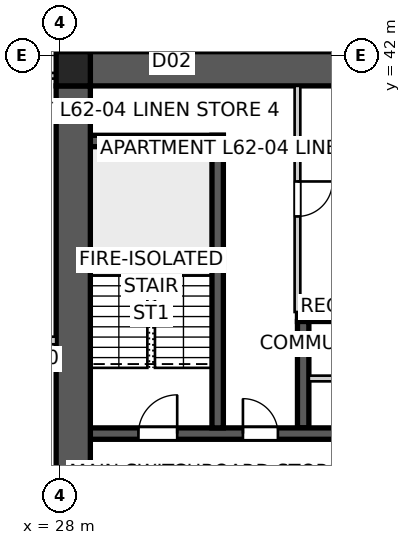
"""IFC4 building model, lengths in metres.
Left out: names, types, materials, properties, quantities, classifications, styles, units other than length and angle.
Written with IfcOpenShell. Run it as: python <this file> out.ifc"""

import sys

from ifc_helpers import new_model, si_unit, direction, frame, frame_2d, origin, origin_2d, place, context, subcontext, project, spatial, polyline, rectangle, outline, extrude, element, fill, save


model = new_model("IFC4")
c1 = context("Model", 3, precision=1e-05, world=origin(), true_north=direction((0.0, 1.0)))
c2 = subcontext(c1, "Body", "Model", "MODEL_VIEW")
j1 = project(units=[si_unit("LENGTHUNIT", "METRE"), si_unit("PLANEANGLEUNIT", "RADIAN")], contexts=[c1])
p1 = place(None, origin())
s1 = spatial("IfcSite", under=j1, at=p1, CompositionType="ELEMENT")
p2 = place(p1, origin())
s2 = spatial("IfcBuilding", under=s1, at=p2, CompositionType="ELEMENT")
p3 = place(p2, frame((0.0, 0.0, 225.2)))
s3 = spatial("IfcBuildingStorey", under=s2, at=p3, CompositionType="ELEMENT", Elevation=225.2)
p4 = place(p3, frame((28.8, 41.65, 0.0), z_axis=(0.0, 0.0, 1.0), x_axis=(1.0, 0.0, 0.0)))
e1 = element("IfcWall", 1, at=p4, inside=s3, PredefinedType="SHEAR", context=c2, shape_type="SweptSolid", body=[
    extrude(outline(polyline([(0.0, -0.45), (22.4, -0.45), (22.4, -0.025), (22.85, -0.025), (22.85, 0.025), (22.4, 0.025), (22.4, 0.45), (0.0, 0.45), (0.0, 0.025), (-0.45, 0.025), (-0.45, -0.025), (0.0, -0.025), (0.0, -0.45)])), origin(), (0.0, 0.0, 1.0), 3.4),
])
p5 = place(p3, frame((28.35, 41.2, 0.0), z_axis=(0.0, 0.0, 1.0), x_axis=(0.0, -1.0, 0.0)))
e2 = element("IfcWall", 2, at=p5, inside=s3, PredefinedType="SHEAR", context=c2, shape_type="SweptSolid", body=[
    extrude(outline(polyline([(0.0, -0.45), (22.4, -0.45), (22.4, -0.025), (22.85, -0.025), (22.85, 0.025), (22.4, 0.025), (22.4, 0.45), (0.0, 0.45), (0.0, 0.025), (-0.45, 0.025), (-0.45, -0.025), (0.0, -0.025), (0.0, -0.45)])), origin(), (0.0, 0.0, 1.0), 3.4),
])
p6 = place(p5, frame((11.14, 0.0, 0.0)))
e3 = element("IfcOpeningElement", 3, at=p6, cuts=e2, PredefinedType="OPENING", context=c2, shape_type="SweptSolid", body=[
    extrude(rectangle(XDim=1.02, YDim=2.4, at=frame_2d((0.51, 1.2))), frame((0.0, 0.46, 0.0), z_axis=(0.0, -1.0, 0.0), x_axis=(1.0, 0.0, 0.0)), (0.0, 0.0, 1.0), 0.92),
])
p7 = place(p3, frame((28.8, 32.05, 0.0), z_axis=(0.0, 0.0, 1.0), x_axis=(1.0, 0.0, 0.0)))
e4 = element("IfcWall", 4, at=p7, inside=s3, PredefinedType="SHEAR", context=c2, shape_type="SweptSolid", body=[
    extrude(rectangle(XDim=22.4, YDim=0.3, at=frame_2d((11.2, 0.0))), origin(), (0.0, 0.0, 1.0), 3.4),
])
p8 = place(p7, frame((19.04, 0.0, 0.0)))
e5 = element("IfcOpeningElement", 5, at=p8, cuts=e4, PredefinedType="OPENING", context=c2, shape_type="SweptSolid", body=[
    extrude(rectangle(XDim=0.92, YDim=2.1, at=frame_2d((0.46, 1.05))), frame((0.0, 0.16, 0.0), z_axis=(0.0, -1.0, 0.0), x_axis=(1.0, 0.0, 0.0)), (0.0, 0.0, 1.0), 0.32),
])
p9 = place(p7, frame((1.265, 0.0, 0.0)))
e6 = element("IfcOpeningElement", 6, at=p9, cuts=e4, PredefinedType="OPENING", context=c2, shape_type="SweptSolid", body=[
    extrude(rectangle(XDim=1.02, YDim=2.1, at=frame_2d((0.51, 1.05))), frame((0.0, 0.16, 0.0), z_axis=(0.0, -1.0, 0.0), x_axis=(1.0, 0.0, 0.0)), (0.0, 0.0, 1.0), 0.32),
])
p10 = place(p7, frame((4.015, 0.0, 0.0)))
e7 = element("IfcOpeningElement", 7, at=p10, cuts=e4, PredefinedType="OPENING", context=c2, shape_type="SweptSolid", body=[
    extrude(rectangle(XDim=0.92, YDim=2.1, at=frame_2d((0.46, 1.05))), frame((0.0, 0.16, 0.0), z_axis=(0.0, -1.0, 0.0), x_axis=(1.0, 0.0, 0.0)), (0.0, 0.0, 1.0), 0.32),
])
p11 = place(p7, frame((7.015, 0.0, 0.0)))
e8 = element("IfcOpeningElement", 8, at=p11, cuts=e4, PredefinedType="OPENING", context=c2, shape_type="SweptSolid", body=[
    extrude(rectangle(XDim=0.92, YDim=2.1, at=frame_2d((0.46, 1.05))), frame((0.0, 0.16, 0.0), z_axis=(0.0, -1.0, 0.0), x_axis=(1.0, 0.0, 0.0)), (0.0, 0.0, 1.0), 0.32),
])
p12 = place(p7, frame((9.34, 0.0, 0.0)))
e9 = element("IfcOpeningElement", 9, at=p12, cuts=e4, PredefinedType="OPENING", context=c2, shape_type="SweptSolid", body=[
    extrude(rectangle(XDim=0.92, YDim=2.1, at=frame_2d((0.46, 1.05))), frame((0.0, 0.16, 0.0), z_axis=(0.0, -1.0, 0.0), x_axis=(1.0, 0.0, 0.0)), (0.0, 0.0, 1.0), 0.32),
])
p13 = place(p7, frame((12.05, 0.0, 0.0)))
e10 = element("IfcOpeningElement", 10, at=p13, cuts=e4, PredefinedType="OPENING", context=c2, shape_type="SweptSolid", body=[
    extrude(rectangle(XDim=1.1, YDim=2.1, at=frame_2d((0.55, 1.05))), frame((0.0, 0.16, 0.0), z_axis=(0.0, -1.0, 0.0), x_axis=(1.0, 0.0, 0.0)), (0.0, 0.0, 1.0), 0.32),
])
p14 = place(p7, frame((14.85, 0.0, 0.0)))
e11 = element("IfcOpeningElement", 11, at=p14, cuts=e4, PredefinedType="OPENING", context=c2, shape_type="SweptSolid", body=[
    extrude(rectangle(XDim=1.1, YDim=2.1, at=frame_2d((0.55, 1.05))), frame((0.0, 0.16, 0.0), z_axis=(0.0, -1.0, 0.0), x_axis=(1.0, 0.0, 0.0)), (0.0, 0.0, 1.0), 0.32),
])
p15 = place(p3, frame((34.25, 35.15, 0.0), z_axis=(0.0, 0.0, 1.0), x_axis=(1.0, 0.0, 0.0)))
e12 = element("IfcWall", 12, at=p15, inside=s3, PredefinedType="SHEAR", context=c2, shape_type="SweptSolid", body=[
    extrude(rectangle(XDim=11.5, YDim=0.3, at=frame_2d((5.75, 0.0))), origin(), (0.0, 0.0, 1.0), 3.4),
])
p16 = place(p3, frame((34.4, 32.2, 0.0), z_axis=(0.0, 0.0, 1.0), x_axis=(0.0, 1.0, 0.0)))
e13 = element("IfcWall", 13, at=p16, inside=s3, PredefinedType="SHEAR", context=c2, shape_type="SweptSolid", body=[
    extrude(rectangle(XDim=2.8, YDim=0.3, at=frame_2d((1.4, 0.0))), origin(), (0.0, 0.0, 1.0), 3.4),
])
p17 = place(p3, frame((32.15, 32.2, 0.0), z_axis=(0.0, 0.0, 1.0), x_axis=(0.0, 1.0, 0.0)))
e14 = element("IfcWall", 14, at=p17, inside=s3, PredefinedType="SHEAR", context=c2, shape_type="SweptSolid", body=[
    extrude(rectangle(XDim=7.7, YDim=0.3, at=frame_2d((3.85, 0.0))), origin(), (0.0, 0.0, 1.0), 3.4),
])
p18 = place(p3, frame((28.8, 39.75, 0.0), z_axis=(0.0, 0.0, 1.0), x_axis=(1.0, 0.0, 0.0)))
e15 = element("IfcWall", 15, at=p18, inside=s3, PredefinedType="SHEAR", context=c2, shape_type="SweptSolid", body=[
    extrude(rectangle(XDim=3.5, YDim=0.3, at=frame_2d((1.75, 0.0))), origin(), (0.0, 0.0, 1.0), 3.4),
])
p19 = place(p3, frame((28.35, 41.65, 0.0), z_axis=(0.0, 0.0, 1.0), x_axis=(1.0, 0.0, 0.0)))
e16 = element("IfcColumn", 16, at=p19, inside=s3, PredefinedType="COLUMN", context=c2, shape_type="SweptSolid", body=[
    extrude(rectangle(XDim=0.9, YDim=0.9, at=origin_2d()), origin(), (0.0, 0.0, 1.0), 3.4),
])
p20 = place(p3, frame((27.9, 34.5, 0.0), z_axis=(0.0, 0.0, 1.0), x_axis=(-1.0, 0.0, 0.0)))
e17 = element("IfcWall", 17, at=p20, inside=s3, PredefinedType="PARTITIONING", context=c2, shape_type="SweptSolid", body=[
    extrude(rectangle(XDim=2.5, YDim=0.2, at=frame_2d((1.25, 0.0))), origin(), (0.0, 0.0, 1.0), 3.25),
])
p21 = place(p3, frame((34.25, 41.2, 0.0), z_axis=(0.0, 0.0, 1.0), x_axis=(0.0, -1.0, 0.0)))
e18 = element("IfcWall", 18, at=p21, inside=s3, PredefinedType="SOLIDWALL", context=c2, shape_type="SweptSolid", body=[
    extrude(rectangle(XDim=5.95, YDim=0.15, at=frame_2d((2.975, 0.0))), origin(), (0.0, 0.0, 1.0), 3.25),
])
p22 = place(p21, frame((2.515, 0.0, 0.0)))
e19 = element("IfcOpeningElement", 19, at=p22, cuts=e18, PredefinedType="OPENING", context=c2, shape_type="SweptSolid", body=[
    extrude(rectangle(XDim=0.92, YDim=2.1, at=frame_2d((0.46, 1.05))), frame((0.0, 0.085, 0.0), z_axis=(0.0, -1.0, 0.0), x_axis=(1.0, 0.0, 0.0)), (0.0, 0.0, 1.0), 0.17),
])
p23 = place(p3, frame((24.0, 41.467, 0.0), z_axis=(0.0, 0.0, 1.0), x_axis=(1.0, 0.0, 0.0)))
e20 = element("IfcWall", 20, at=p23, inside=s3, PredefinedType="SOLIDWALL", context=c2, shape_type="SweptSolid", body=[
    extrude(rectangle(XDim=4.82, YDim=0.15, at=frame_2d((2.41, 0.0))), origin(), (0.0, 0.0, 1.0), 3.25),
])
p24 = place(p23, frame((1.49, 0.0, 0.0)))
e21 = element("IfcOpeningElement", 21, at=p24, cuts=e20, PredefinedType="OPENING", context=c2, shape_type="SweptSolid", body=[
    extrude(rectangle(XDim=0.92, YDim=2.1, at=frame_2d((0.46, 1.05))), frame((0.0, 0.085, 0.0), z_axis=(0.0, -1.0, 0.0), x_axis=(1.0, 0.0, 0.0)), (0.0, 0.0, 1.0), 0.17),
])
p25 = place(p3, frame((34.55, 33.5, 0.0), z_axis=(0.0, 0.0, 1.0), x_axis=(1.0, 0.0, 0.0)))
e22 = element("IfcWall", 22, at=p25, inside=s3, PredefinedType="SOLIDWALL", context=c2, shape_type="SweptSolid", body=[
    extrude(rectangle(XDim=5.35, YDim=0.15, at=frame_2d((2.675, 0.0))), origin(), (0.0, 0.0, 1.0), 3.25),
])
p26 = place(p25, frame((2.215, 0.0, 0.0)))
e23 = element("IfcOpeningElement", 23, at=p26, cuts=e22, PredefinedType="OPENING", context=c2, shape_type="SweptSolid", body=[
    extrude(rectangle(XDim=0.92, YDim=2.1, at=frame_2d((0.46, 1.05))), frame((0.0, 0.085, 0.0), z_axis=(0.0, -1.0, 0.0), x_axis=(1.0, 0.0, 0.0)), (0.0, 0.0, 1.0), 0.17),
])
p27 = place(p9, origin())
e24 = element("IfcDoor", 24, at=p27, inside=s3, OperationType="SINGLE_SWING_RIGHT", PredefinedType="DOOR", context=c2, shape_type="SweptSolid", body=[
    extrude(rectangle(XDim=1.02, YDim=2.1, at=frame_2d((0.51, 1.05))), frame((0.0, 0.025, 0.0), z_axis=(0.0, -1.0, 0.0), x_axis=(1.0, 0.0, 0.0)), (0.0, 0.0, 1.0), 0.05),
])
fill(e6, e24)
p28 = place(p10, origin())
e25 = element("IfcDoor", 25, at=p28, inside=s3, OperationType="SINGLE_SWING_LEFT", PredefinedType="DOOR", context=c2, shape_type="SweptSolid", body=[
    extrude(rectangle(XDim=0.92, YDim=2.1, at=frame_2d((0.46, 1.05))), frame((0.0, 0.025, 0.0), z_axis=(0.0, -1.0, 0.0), x_axis=(1.0, 0.0, 0.0)), (0.0, 0.0, 1.0), 0.05),
])
fill(e7, e25)
p29 = place(p22, origin())
e26 = element("IfcDoor", 26, at=p29, inside=s3, OperationType="SINGLE_SWING_LEFT", PredefinedType="DOOR", context=c2, shape_type="SweptSolid", body=[
    extrude(rectangle(XDim=0.92, YDim=2.1, at=frame_2d((0.46, 1.05))), frame((0.0, 0.025, 0.0), z_axis=(0.0, -1.0, 0.0), x_axis=(1.0, 0.0, 0.0)), (0.0, 0.0, 1.0), 0.05),
])
fill(e19, e26)
save(model, sys.argv[1])
